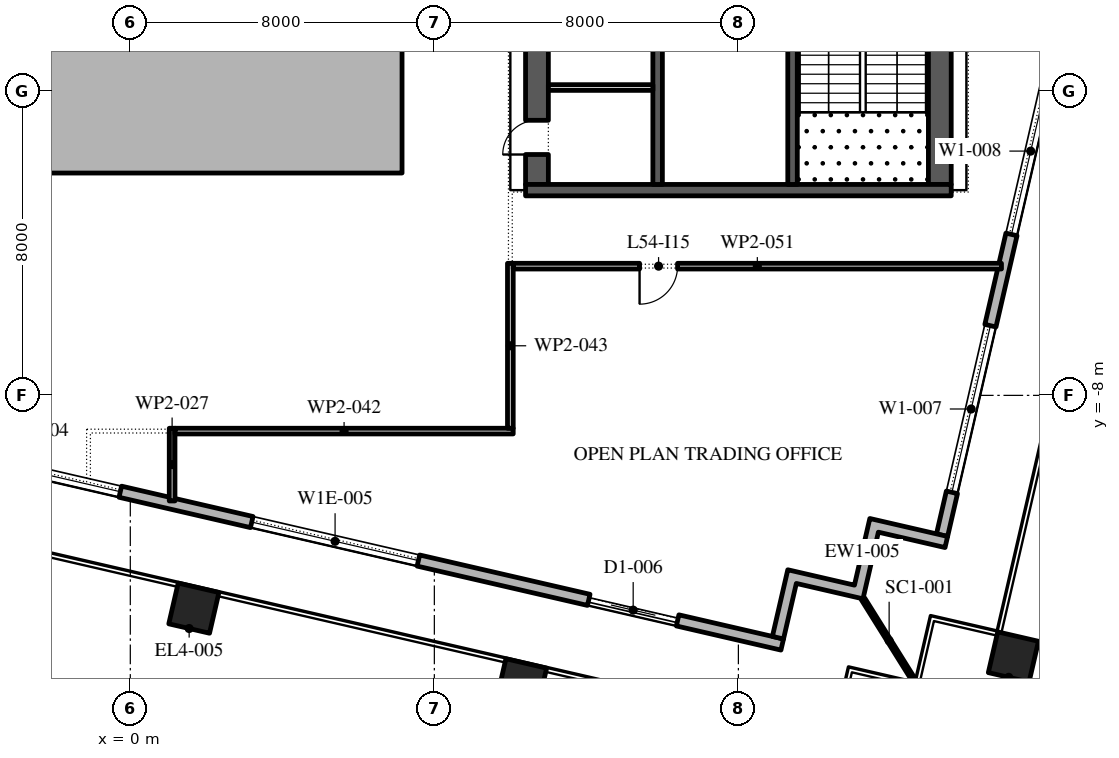
"""IFC4 building model, lengths in metres.
Left out: names, types, materials, properties, quantities, classifications, styles, units other than length and angle.
Written with IfcOpenShell. Run it as: python <this file> out.ifc"""

import sys

from ifc_helpers import new_model, si_unit, direction, frame, frame_2d, origin, origin_2d, place, context, subcontext, project, spatial, polyline, rectangle, outline, extrude, element, fill, save


model = new_model("IFC4")
c1 = context("Model", 3, precision=1e-05, world=origin(), true_north=direction((0.0, 1.0)))
c2 = subcontext(c1, "Body", "Model", "MODEL_VIEW")
j1 = project(units=[si_unit("LENGTHUNIT", "METRE"), si_unit("PLANEANGLEUNIT", "RADIAN")], contexts=[c1])
p1 = place(None, origin())
s1 = spatial("IfcSite", under=j1, at=p1, CompositionType="ELEMENT")
p2 = place(p1, origin())
s2 = spatial("IfcBuilding", under=s1, at=p2, CompositionType="ELEMENT")
p3 = place(p2, frame((0.0, 0.0, 251.4)))
s3 = spatial("IfcBuildingStorey", under=s2, at=p3, CompositionType="ELEMENT", Elevation=251.4)
for number, where, z_axis, x_axis in (
    (1, (1.672, -13.599, 0.0), (0.0, 0.0, 1.0), (0.974, -0.225, 0.0)),
    (2, (10.295, -15.59, 0.0), (0.0, 0.0, 1.0), (0.974, -0.225, 0.0)),
    (3, (23.236, -14.883, 0.0), (0.0, 0.0, 1.0), (0.974, -0.225, 0.0)),
):
    element("IfcColumn", number, at=place(p3, frame(where, z_axis=z_axis, x_axis=x_axis)), inside=s3, PredefinedType="COLUMN", context=c2, shape_type="SweptSolid", body=[
        extrude(rectangle(XDim=1.1, YDim=1.1, at=origin_2d()), origin(), (0.0, 0.0, 1.0), 4.2),
    ])
p4 = place(p3, origin())
e4 = element("IfcWall", 4, at=p4, inside=s3, PredefinedType="STANDARD", context=c2, shape_type="SweptSolid", body=[
    extrude(outline(polyline([(-7.15, -2.15), (7.15, -2.15), (7.15, 16.15), (-7.15, 16.15), (-7.15, -2.15)]), holes=[polyline([(-7.0, -2.0), (-7.0, 16.0), (7.0, 16.0), (7.0, -2.0), (-7.0, -2.0)])]), origin(), (0.0, 0.0, 1.0), 4.0),
])
p5 = place(p3, frame((-29.616, -3.758, 0.0), z_axis=(0.0, 0.0, 1.0), x_axis=(0.974370532314, -0.224949029246, 0.0)))
e5 = element("IfcWall", 5, at=p5, inside=s3, PredefinedType="STANDARD", context=c2, shape_type="SweptSolid", body=[
    extrude(rectangle(XDim=48.0, YDim=0.3, at=frame_2d((24.0, 0.0))), origin(), (0.0, 0.0, 1.0), 4.0),
])
p6 = place(p5, frame((1.625, 0.0, 0.45)))
e6 = element("IfcOpeningElement", 6, at=p6, cuts=e5, PredefinedType="OPENING", context=c2, shape_type="SweptSolid", body=[
    extrude(rectangle(XDim=4.5, YDim=3.05, at=frame_2d((2.25, 1.525))), frame((0.0, 0.16, 0.0), z_axis=(0.0, -1.0, 0.0), x_axis=(1.0, 0.0, 0.0)), (0.0, 0.0, 1.0), 0.32),
])
p7 = place(p5, frame((10.575, 0.0, 0.0)))
e7 = element("IfcOpeningElement", 7, at=p7, cuts=e5, PredefinedType="OPENING", context=c2, shape_type="SweptSolid", body=[
    extrude(rectangle(XDim=2.4, YDim=3.5, at=frame_2d((1.2, 1.75))), frame((0.0, 0.16, 0.0), z_axis=(0.0, -1.0, 0.0), x_axis=(1.0, 0.0, 0.0)), (0.0, 0.0, 1.0), 0.32),
])
p8 = place(p5, frame((17.575, 0.0, 0.45)))
e8 = element("IfcOpeningElement", 8, at=p8, cuts=e5, PredefinedType="OPENING", context=c2, shape_type="SweptSolid", body=[
    extrude(rectangle(XDim=4.5, YDim=3.0, at=frame_2d((2.25, 1.5))), frame((0.0, 0.16, 0.0), z_axis=(0.0, -1.0, 0.0), x_axis=(1.0, 0.0, 0.0)), (0.0, 0.0, 1.0), 0.32),
])
p9 = place(p5, frame((25.625, 0.0, 0.45)))
e9 = element("IfcOpeningElement", 9, at=p9, cuts=e5, PredefinedType="OPENING", context=c2, shape_type="SweptSolid", body=[
    extrude(rectangle(XDim=4.5, YDim=3.05, at=frame_2d((2.25, 1.525))), frame((0.0, 0.16, 0.0), z_axis=(0.0, -1.0, 0.0), x_axis=(1.0, 0.0, 0.0)), (0.0, 0.0, 1.0), 0.32),
])
p10 = place(p5, frame((33.675, 0.0, 0.45)))
e10 = element("IfcOpeningElement", 10, at=p10, cuts=e5, PredefinedType="OPENING", context=c2, shape_type="SweptSolid", body=[
    extrude(rectangle(XDim=4.5, YDim=2.825, at=frame_2d((2.25, 1.413))), frame((0.0, 0.16, 0.0), z_axis=(0.0, -1.0, 0.0), x_axis=(1.0, 0.0, 0.0)), (0.0, 0.0, 1.0), 0.32),
])
p11 = place(p5, frame((42.775, 0.0, 0.0)))
e11 = element("IfcOpeningElement", 11, at=p11, cuts=e5, PredefinedType="OPENING", context=c2, shape_type="SweptSolid", body=[
    extrude(rectangle(XDim=2.4, YDim=3.5, at=frame_2d((1.2, 1.75))), frame((0.0, 0.16, 0.0), z_axis=(0.0, -1.0, 0.0), x_axis=(1.0, 0.0, 0.0)), (0.0, 0.0, 1.0), 0.32),
])
p12 = place(p3, frame((21.359, -11.678, 0.0), z_axis=(0.0, 0.0, 1.0), x_axis=(0.224949198343, 0.974370493275, 0.0)))
e12 = element("IfcWall", 12, at=p12, inside=s3, PredefinedType="STANDARD", context=c2, shape_type="SweptSolid", body=[
    extrude(rectangle(XDim=49.5, YDim=0.3, at=frame_2d((24.75, 0.0))), origin(), (0.0, 0.0, 1.0), 4.0),
])
p13 = place(p12, frame((1.157, 0.0, 0.45)))
e13 = element("IfcOpeningElement", 13, at=p13, cuts=e12, PredefinedType="OPENING", context=c2, shape_type="SweptSolid", body=[
    extrude(rectangle(XDim=4.5, YDim=3.05, at=frame_2d((2.25, 1.525))), frame((0.0, 0.16, 0.0), z_axis=(0.0, -1.0, 0.0), x_axis=(1.0, 0.0, 0.0)), (0.0, 0.0, 1.0), 0.32),
])
p14 = place(p12, frame((8.121, 0.0, 0.45)))
e14 = element("IfcOpeningElement", 14, at=p14, cuts=e12, PredefinedType="OPENING", context=c2, shape_type="SweptSolid", body=[
    extrude(rectangle(XDim=4.5, YDim=3.05, at=frame_2d((2.25, 1.525))), frame((0.0, 0.16, 0.0), z_axis=(0.0, -1.0, 0.0), x_axis=(1.0, 0.0, 0.0)), (0.0, 0.0, 1.0), 0.32),
])
p15 = place(p12, frame((15.236, 0.0, 0.45)))
e15 = element("IfcOpeningElement", 15, at=p15, cuts=e12, PredefinedType="OPENING", context=c2, shape_type="SweptSolid", body=[
    extrude(rectangle(XDim=4.5, YDim=3.05, at=frame_2d((2.25, 1.525))), frame((0.0, 0.16, 0.0), z_axis=(0.0, -1.0, 0.0), x_axis=(1.0, 0.0, 0.0)), (0.0, 0.0, 1.0), 0.32),
])
p16 = place(p12, frame((22.35, 0.0, 0.45)))
e16 = element("IfcOpeningElement", 16, at=p16, cuts=e12, PredefinedType="OPENING", context=c2, shape_type="SweptSolid", body=[
    extrude(rectangle(XDim=4.5, YDim=3.05, at=frame_2d((2.25, 1.525))), frame((0.0, 0.16, 0.0), z_axis=(0.0, -1.0, 0.0), x_axis=(1.0, 0.0, 0.0)), (0.0, 0.0, 1.0), 0.32),
])
p17 = place(p12, frame((29.464, 0.0, 0.45)))
e17 = element("IfcOpeningElement", 17, at=p17, cuts=e12, PredefinedType="OPENING", context=c2, shape_type="SweptSolid", body=[
    extrude(rectangle(XDim=4.5, YDim=2.95, at=frame_2d((2.25, 1.475))), frame((0.0, 0.16, 0.0), z_axis=(0.0, -1.0, 0.0), x_axis=(1.0, 0.0, 0.0)), (0.0, 0.0, 1.0), 0.32),
])
p18 = place(p12, frame((37.628, 0.0, 0.0)))
e18 = element("IfcOpeningElement", 18, at=p18, cuts=e12, PredefinedType="OPENING", context=c2, shape_type="SweptSolid", body=[
    extrude(rectangle(XDim=2.4, YDim=3.325, at=frame_2d((1.2, 1.663))), frame((0.0, 0.16, 0.0), z_axis=(0.0, -1.0, 0.0), x_axis=(1.0, 0.0, 0.0)), (0.0, 0.0, 1.0), 0.32),
])
p19 = place(p12, frame((43.693, 0.0, 0.45)))
e19 = element("IfcOpeningElement", 19, at=p19, cuts=e12, PredefinedType="OPENING", context=c2, shape_type="SweptSolid", body=[
    extrude(rectangle(XDim=4.5, YDim=3.05, at=frame_2d((2.25, 1.525))), frame((0.0, 0.16, 0.0), z_axis=(0.0, -1.0, 0.0), x_axis=(1.0, 0.0, 0.0)), (0.0, 0.0, 1.0), 0.32),
])
p20 = place(p3, origin())
e20 = element("IfcWall", 20, at=p20, inside=s3, PredefinedType="STANDARD", context=c2, shape_type="SweptSolid", body=[
    extrude(outline(polyline([(19.054, -12.993), (19.459, -11.24), (21.505, -11.712), (21.438, -12.004), (19.684, -11.599), (19.279, -13.353), (17.525, -12.948), (17.188, -14.41), (16.895, -14.342), (17.3, -12.588), (19.054, -12.993)])), origin(), (0.0, 0.0, 1.0), 4.0),
])
p21 = place(p3, frame((19.279, -13.353, -0.05), z_axis=(0.0, 0.0, 1.0), x_axis=(0.529914407191, -0.848051131154, 0.0)))
e21 = element("IfcWall", 21, at=p21, inside=s3, PredefinedType="STANDARD", context=c2, shape_type="SweptSolid", body=[
    extrude(rectangle(XDim=2.596, YDim=0.1, at=frame_2d((1.298, 0.0))), origin(), (0.0, 0.0, 1.0), 4.05),
])
p22 = place(p3, frame((21.3, -2.45, 0.0), z_axis=(0.0, 0.0, 1.0), x_axis=(0.0, 1.0, 0.0)))
e22 = element("IfcWall", 22, at=p22, inside=s3, PredefinedType="SHEAR", context=c2, shape_type="SweptSolid", body=[
    extrude(rectangle(XDim=27.9, YDim=0.6, at=frame_2d((13.95, 0.0))), origin(), (0.0, 0.0, 1.0), 4.0),
])
p23 = place(p22, frame((5.05, 0.0, 0.0)))
e23 = element("IfcOpeningElement", 23, at=p23, cuts=e22, PredefinedType="OPENING", context=c2, shape_type="SweptSolid", body=[
    extrude(rectangle(XDim=1.2, YDim=2.1, at=frame_2d((0.6, 1.05))), frame((0.0, 0.31, 0.0), z_axis=(0.0, -1.0, 0.0), x_axis=(1.0, 0.0, 0.0)), (0.0, 0.0, 1.0), 0.62),
])
p24 = place(p22, frame((21.65, 0.0, 0.0)))
e24 = element("IfcOpeningElement", 24, at=p24, cuts=e22, PredefinedType="OPENING", context=c2, shape_type="SweptSolid", body=[
    extrude(rectangle(XDim=1.2, YDim=2.1, at=frame_2d((0.6, 1.05))), frame((0.0, 0.31, 0.0), z_axis=(0.0, -1.0, 0.0), x_axis=(1.0, 0.0, 0.0)), (0.0, 0.0, 1.0), 0.62),
])
p25 = place(p3, frame((10.7, -2.45, 0.0), z_axis=(0.0, 0.0, 1.0), x_axis=(0.0, 1.0, 0.0)))
e25 = element("IfcWall", 25, at=p25, inside=s3, PredefinedType="SHEAR", context=c2, shape_type="SweptSolid", body=[
    extrude(rectangle(XDim=27.9, YDim=0.6, at=frame_2d((13.95, 0.0))), origin(), (0.0, 0.0, 1.0), 4.0),
])
p26 = place(p25, frame((23.65, 0.0, 0.0)))
e26 = element("IfcOpeningElement", 26, at=p26, cuts=e25, PredefinedType="OPENING", context=c2, shape_type="SweptSolid", body=[
    extrude(rectangle(XDim=2.4, YDim=2.1, at=frame_2d((1.2, 1.05))), frame((0.0, 0.31, 0.0), z_axis=(0.0, -1.0, 0.0), x_axis=(1.0, 0.0, 0.0)), (0.0, 0.0, 1.0), 0.62),
])
p27 = place(p25, frame((0.788, 0.0, 0.0)))
e27 = element("IfcOpeningElement", 27, at=p27, cuts=e25, PredefinedType="OPENING", context=c2, shape_type="SweptSolid", body=[
    extrude(rectangle(XDim=0.9, YDim=2.1, at=frame_2d((0.45, 1.05))), frame((0.0, 0.31, 0.0), z_axis=(0.0, -1.0, 0.0), x_axis=(1.0, 0.0, 0.0)), (0.0, 0.0, 1.0), 0.62),
])
p28 = place(p25, frame((3.962, 0.0, 0.0)))
e28 = element("IfcOpeningElement", 28, at=p28, cuts=e25, PredefinedType="OPENING", context=c2, shape_type="SweptSolid", body=[
    extrude(rectangle(XDim=1.0, YDim=2.1, at=frame_2d((0.5, 1.05))), frame((0.0, 0.31, 0.0), z_axis=(0.0, -1.0, 0.0), x_axis=(1.0, 0.0, 0.0)), (0.0, 0.0, 1.0), 0.62),
])
p29 = place(p3, frame((10.4, -2.6, 0.0), z_axis=(0.0, 0.0, 1.0), x_axis=(1.0, 0.0, 0.0)))
e29 = element("IfcWall", 29, at=p29, inside=s3, PredefinedType="SHEAR", context=c2, shape_type="SweptSolid", body=[
    extrude(rectangle(XDim=11.2, YDim=0.3, at=frame_2d((5.6, 0.0))), origin(), (0.0, 0.0, 1.0), 4.0),
])
p30 = place(p3, frame((17.425, -2.45, 0.0), z_axis=(0.0, 0.0, 1.0), x_axis=(0.0, 1.0, 0.0)))
e30 = element("IfcWall", 30, at=p30, inside=s3, PredefinedType="SHEAR", context=c2, shape_type="SweptSolid", body=[
    extrude(rectangle(XDim=6.3, YDim=0.25, at=frame_2d((3.15, 0.0))), origin(), (0.0, 0.0, 1.0), 4.0),
])
p31 = place(p30, frame((5.05, 0.0, 0.0)))
e31 = element("IfcOpeningElement", 31, at=p31, cuts=e30, PredefinedType="OPENING", context=c2, shape_type="SweptSolid", body=[
    extrude(rectangle(XDim=1.2, YDim=2.1, at=frame_2d((0.6, 1.05))), frame((0.0, 0.135, 0.0), z_axis=(0.0, -1.0, 0.0), x_axis=(1.0, 0.0, 0.0)), (0.0, 0.0, 1.0), 0.27),
])
p32 = place(p3, frame((13.875, -2.45, 0.0), z_axis=(0.0, 0.0, 1.0), x_axis=(0.0, 1.0, 0.0)))
e32 = element("IfcWall", 32, at=p32, inside=s3, PredefinedType="SHEAR", context=c2, shape_type="SweptSolid", body=[
    extrude(rectangle(XDim=21.3, YDim=0.25, at=frame_2d((10.65, 0.0))), origin(), (0.0, 0.0, 1.0), 4.0),
])
p33 = place(p32, frame((17.786, 0.0, 0.0)))
e33 = element("IfcOpeningElement", 33, at=p33, cuts=e32, PredefinedType="OPENING", context=c2, shape_type="SweptSolid", body=[
    extrude(rectangle(XDim=0.9, YDim=2.1, at=frame_2d((0.45, 1.05))), frame((0.0, 0.135, 0.0), z_axis=(0.0, -1.0, 0.0), x_axis=(1.0, 0.0, 0.0)), (0.0, 0.0, 1.0), 0.27),
])
p34 = place(p32, frame((6.971, 0.0, 0.0)))
e34 = element("IfcOpeningElement", 34, at=p34, cuts=e32, PredefinedType="OPENING", context=c2, shape_type="SweptSolid", body=[
    extrude(rectangle(XDim=1.1, YDim=2.1, at=frame_2d((0.55, 1.05))), frame((0.0, 0.135, 0.0), z_axis=(0.0, -1.0, 0.0), x_axis=(1.0, 0.0, 0.0)), (0.0, 0.0, 1.0), 0.27),
])
p35 = place(p32, frame((9.114, 0.0, 0.0)))
e35 = element("IfcOpeningElement", 35, at=p35, cuts=e32, PredefinedType="OPENING", context=c2, shape_type="SweptSolid", body=[
    extrude(rectangle(XDim=1.1, YDim=2.1, at=frame_2d((0.55, 1.05))), frame((0.0, 0.135, 0.0), z_axis=(0.0, -1.0, 0.0), x_axis=(1.0, 0.0, 0.0)), (0.0, 0.0, 1.0), 0.27),
])
p36 = place(p32, frame((11.257, 0.0, 0.0)))
e36 = element("IfcOpeningElement", 36, at=p36, cuts=e32, PredefinedType="OPENING", context=c2, shape_type="SweptSolid", body=[
    extrude(rectangle(XDim=1.1, YDim=2.1, at=frame_2d((0.55, 1.05))), frame((0.0, 0.135, 0.0), z_axis=(0.0, -1.0, 0.0), x_axis=(1.0, 0.0, 0.0)), (0.0, 0.0, 1.0), 0.27),
])
p37 = place(p32, frame((13.4, 0.0, 0.0)))
e37 = element("IfcOpeningElement", 37, at=p37, cuts=e32, PredefinedType="OPENING", context=c2, shape_type="SweptSolid", body=[
    extrude(rectangle(XDim=1.1, YDim=2.1, at=frame_2d((0.55, 1.05))), frame((0.0, 0.135, 0.0), z_axis=(0.0, -1.0, 0.0), x_axis=(1.0, 0.0, 0.0)), (0.0, 0.0, 1.0), 0.27),
])
p38 = place(p3, frame((11.0, 0.1, 0.0), z_axis=(0.0, 0.0, 1.0), x_axis=(1.0, 0.0, 0.0)))
e38 = element("IfcWall", 38, at=p38, inside=s3, PredefinedType="PARTITIONING", context=c2, shape_type="SweptSolid", body=[
    extrude(rectangle(XDim=2.75, YDim=0.15, at=frame_2d((1.375, 0.0))), origin(), (0.0, 0.0, 1.0), 4.0),
])
p39 = place(p3, frame((1.1, -8.865, 0.0), z_axis=(0.0, 0.0, 1.0), x_axis=(0.0, -1.0, 0.0)))
e39 = element("IfcWall", 39, at=p39, inside=s3, PredefinedType="PARTITIONING", context=c2, shape_type="SweptSolid", body=[
    extrude(rectangle(XDim=1.913, YDim=0.15, at=frame_2d((0.957, 0.0))), origin(), (0.0, 0.0, 1.0), 4.0),
])
p40 = place(p3, frame((10.075, -8.94, 0.0), z_axis=(0.0, 0.0, 1.0), x_axis=(-1.0, 0.0, 0.0)))
e40 = element("IfcWall", 40, at=p40, inside=s3, PredefinedType="PARTITIONING", context=c2, shape_type="SweptSolid", body=[
    extrude(rectangle(XDim=8.9, YDim=0.15, at=frame_2d((4.45, 0.0))), origin(), (0.0, 0.0, 1.0), 4.0),
])
p41 = place(p3, frame((10.0, -4.525, 0.0), z_axis=(0.0, 0.0, 1.0), x_axis=(0.0, -1.0, 0.0)))
e41 = element("IfcWall", 41, at=p41, inside=s3, PredefinedType="PARTITIONING", context=c2, shape_type="SweptSolid", body=[
    extrude(rectangle(XDim=4.34, YDim=0.15, at=frame_2d((2.17, 0.0))), origin(), (0.0, 0.0, 1.0), 4.0),
])
p42 = place(p3, frame((22.922, -4.6, 0.0), z_axis=(0.0, 0.0, 1.0), x_axis=(-1.0, 0.0, 0.0)))
e42 = element("IfcWall", 42, at=p42, inside=s3, PredefinedType="PARTITIONING", context=c2, shape_type="SweptSolid", body=[
    extrude(rectangle(XDim=12.847, YDim=0.15, at=frame_2d((6.424, 0.0))), origin(), (0.0, 0.0, 1.0), 4.0),
])
p43 = place(p42, frame((8.522, 0.0, 0.0)))
e43 = element("IfcOpeningElement", 43, at=p43, cuts=e42, PredefinedType="OPENING", context=c2, shape_type="SweptSolid", body=[
    extrude(rectangle(XDim=1.0, YDim=2.1, at=frame_2d((0.5, 1.05))), frame((0.0, 0.085, 0.0), z_axis=(0.0, -1.0, 0.0), x_axis=(1.0, 0.0, 0.0)), (0.0, 0.0, 1.0), 0.17),
])
p44 = place(p9, origin())
e44 = element("IfcWindow", 44, at=p44, inside=s3, PartitioningType="DOUBLE_PANEL_VERTICAL", PredefinedType="WINDOW", context=c2, shape_type="SweptSolid", body=[
    extrude(rectangle(XDim=4.5, YDim=3.05, at=frame_2d((2.25, 1.525))), frame((0.0, 0.03, 0.0), z_axis=(0.0, -1.0, 0.0), x_axis=(1.0, 0.0, 0.0)), (0.0, 0.0, 1.0), 0.06),
])
fill(e9, e44)
p45 = place(p10, origin())
e45 = element("IfcWindow", 45, at=p45, inside=s3, PartitioningType="DOUBLE_PANEL_VERTICAL", PredefinedType="WINDOW", context=c2, shape_type="SweptSolid", body=[
    extrude(rectangle(XDim=4.5, YDim=2.825, at=frame_2d((2.25, 1.413))), frame((0.0, 0.03, 0.0), z_axis=(0.0, -1.0, 0.0), x_axis=(1.0, 0.0, 0.0)), (0.0, 0.0, 1.0), 0.06),
])
fill(e10, e45)
p46 = place(p11, origin())
e46 = element("IfcDoor", 46, at=p46, inside=s3, OperationType="DOUBLE_DOOR_SLIDING", PredefinedType="DOOR", context=c2, shape_type="SweptSolid", body=[
    extrude(rectangle(XDim=2.4, YDim=3.5, at=frame_2d((1.2, 1.75))), frame((0.0, 0.025, 0.0), z_axis=(0.0, -1.0, 0.0), x_axis=(1.0, 0.0, 0.0)), (0.0, 0.0, 1.0), 0.05),
])
fill(e11, e46)
p47 = place(p13, origin())
e47 = element("IfcWindow", 47, at=p47, inside=s3, PartitioningType="DOUBLE_PANEL_VERTICAL", PredefinedType="WINDOW", context=c2, shape_type="SweptSolid", body=[
    extrude(rectangle(XDim=4.5, YDim=3.05, at=frame_2d((2.25, 1.525))), frame((0.0, 0.03, 0.0), z_axis=(0.0, -1.0, 0.0), x_axis=(1.0, 0.0, 0.0)), (0.0, 0.0, 1.0), 0.06),
])
fill(e13, e47)
p48 = place(p14, origin())
e48 = element("IfcWindow", 48, at=p48, inside=s3, PartitioningType="DOUBLE_PANEL_VERTICAL", PredefinedType="WINDOW", context=c2, shape_type="SweptSolid", body=[
    extrude(rectangle(XDim=4.5, YDim=3.05, at=frame_2d((2.25, 1.525))), frame((0.0, 0.03, 0.0), z_axis=(0.0, -1.0, 0.0), x_axis=(1.0, 0.0, 0.0)), (0.0, 0.0, 1.0), 0.06),
])
fill(e14, e48)
p49 = place(p27, origin())
e49 = element("IfcDoor", 49, at=p49, inside=s3, OperationType="SINGLE_SWING_RIGHT", PredefinedType="DOOR", context=c2, shape_type="SweptSolid", body=[
    extrude(rectangle(XDim=0.9, YDim=2.1, at=frame_2d((0.45, 1.05))), frame((0.0, -0.25, 0.0), z_axis=(0.0, -1.0, 0.0), x_axis=(1.0, 0.0, 0.0)), (0.0, 0.0, 1.0), 0.05),
])
fill(e27, e49)
p50 = place(p43, origin())
e50 = element("IfcDoor", 50, at=p50, inside=s3, OperationType="SINGLE_SWING_LEFT", PredefinedType="DOOR", context=c2, shape_type="SweptSolid", body=[
    extrude(rectangle(XDim=1.0, YDim=2.1, at=frame_2d((0.5, 1.05))), frame((0.0, 0.025, 0.0), z_axis=(0.0, -1.0, 0.0), x_axis=(1.0, 0.0, 0.0)), (0.0, 0.0, 1.0), 0.05),
])
fill(e43, e50)
save(model, sys.argv[1])
